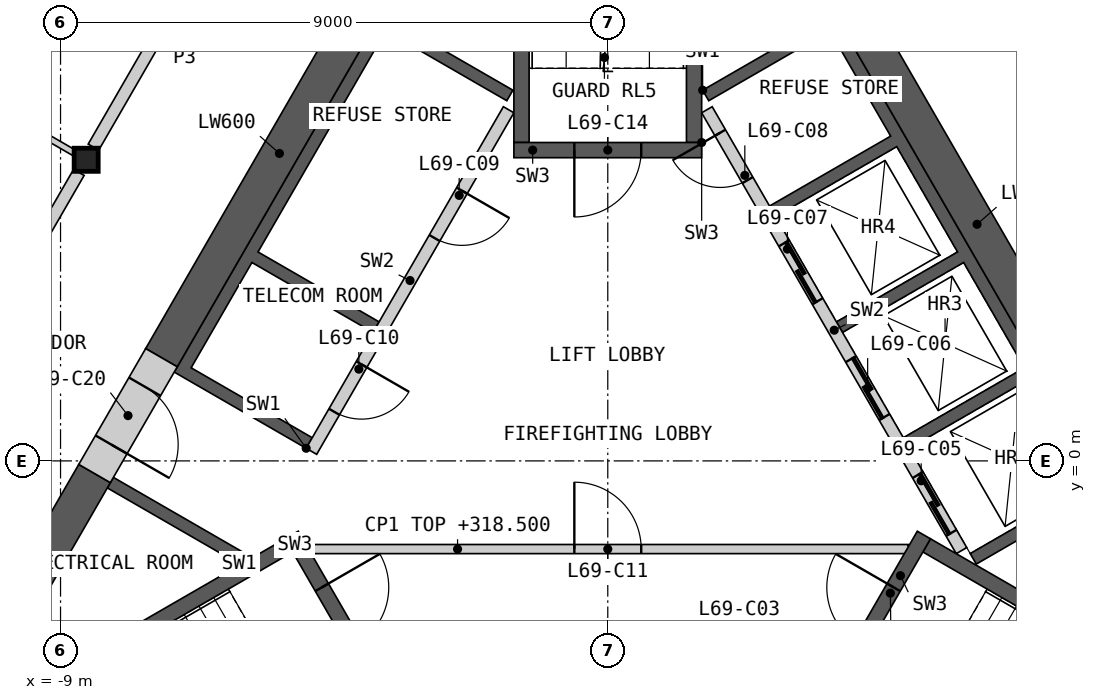
"""IFC4 building model, lengths in metres.
Left out: names, types, materials, properties, quantities, classifications, styles, units other than length and angle.
Written with IfcOpenShell. Run it as: python <this file> out.ifc"""

import sys

from ifc_helpers import new_model, si_unit, direction, frame, frame_2d, origin, origin_2d, place, context, subcontext, project, spatial, polyline, rectangle, i_section, outline, extrude, element, fill, save


model = new_model("IFC4")
c1 = context("Model", 3, precision=1e-05, world=origin(), true_north=direction((0.0, 1.0)))
c2 = subcontext(c1, "Body", "Model", "MODEL_VIEW")
j1 = project(units=[si_unit("LENGTHUNIT", "METRE"), si_unit("PLANEANGLEUNIT", "RADIAN")], contexts=[c1])
p1 = place(None, origin())
s1 = spatial("IfcSite", under=j1, at=p1, CompositionType="ELEMENT")
p2 = place(p1, origin())
s2 = spatial("IfcBuilding", under=s1, at=p2, CompositionType="ELEMENT")
p3 = place(p2, frame((0.0, 0.0, 315.4)))
s3 = spatial("IfcBuildingStorey", under=s2, at=p3, CompositionType="ELEMENT", Elevation=315.4)
p4 = place(p3, frame((-8.578, 4.953, 0.0), z_axis=(0.0, 0.0, 1.0), x_axis=(1.0, 0.0, 0.0)))
e1 = element("IfcColumn", 1, at=p4, inside=s3, PredefinedType="COLUMN", context=c2, shape_type="SweptSolid", body=[
    extrude(i_section(OverallWidth=0.396, OverallDepth=0.381, WebThickness=0.019, FlangeThickness=0.03, at=origin_2d()), origin(), (0.0, 0.0, 1.0), 3.4),
])
p5 = place(p3, origin())
e2 = element("IfcWall", 2, at=p5, inside=s3, PredefinedType="SHEAR", context=c2, shape_type="SweptSolid", body=[
    extrude(outline(polyline([(1.561, 6.097), (3.731, 7.35), (8.231, -0.444), (6.061, -1.697), (5.96, -1.524), (7.952, -0.374), (6.952, 1.358), (4.96, 0.208), (4.861, 0.381), (6.852, 1.531), (5.852, 3.263), (3.861, 2.113), (3.76, 2.287), (5.752, 3.437), (4.752, 5.169), (2.76, 4.019), (2.66, 4.192), (4.652, 5.342), (3.652, 7.074), (1.66, 5.924), (1.561, 6.097)])), origin(), (0.0, 0.0, 1.0), 3.1),
])
p6 = place(p3, frame((5.817, -1.476, 0.0), z_axis=(0.0, 0.0, 1.0), x_axis=(-0.500002616675, 0.866023893041, 0.0)))
e3 = element("IfcWall", 3, at=p6, inside=s3, PredefinedType="SOLIDWALL", context=c2, shape_type="SweptSolid", body=[
    extrude(rectangle(XDim=8.373, YDim=0.2, at=frame_2d((4.187, 0.0))), origin(), (0.0, 0.0, 1.0), 3.1),
])
p7 = place(p6, frame((0.337, 0.0, 0.0)))
e4 = element("IfcOpeningElement", 4, at=p7, cuts=e3, PredefinedType="OPENING", context=c2, shape_type="SweptSolid", body=[
    extrude(rectangle(XDim=1.1, YDim=2.1, at=frame_2d((0.55, 1.05))), frame((0.0, 0.11, 0.0), z_axis=(0.0, -1.0, 0.0), x_axis=(1.0, 0.0, 0.0)), (0.0, 0.0, 1.0), 0.22),
])
p8 = place(p6, frame((2.537, 0.0, 0.0)))
e5 = element("IfcOpeningElement", 5, at=p8, cuts=e3, PredefinedType="OPENING", context=c2, shape_type="SweptSolid", body=[
    extrude(rectangle(XDim=1.1, YDim=2.1, at=frame_2d((0.55, 1.05))), frame((0.0, 0.11, 0.0), z_axis=(0.0, -1.0, 0.0), x_axis=(1.0, 0.0, 0.0)), (0.0, 0.0, 1.0), 0.22),
])
p9 = place(p6, frame((4.737, 0.0, 0.0)))
e6 = element("IfcOpeningElement", 6, at=p9, cuts=e3, PredefinedType="OPENING", context=c2, shape_type="SweptSolid", body=[
    extrude(rectangle(XDim=1.1, YDim=2.1, at=frame_2d((0.55, 1.05))), frame((0.0, 0.11, 0.0), z_axis=(0.0, -1.0, 0.0), x_axis=(1.0, 0.0, 0.0)), (0.0, 0.0, 1.0), 0.22),
])
p10 = place(p6, frame((7.037, 0.0, 0.0)))
e7 = element("IfcOpeningElement", 7, at=p10, cuts=e3, PredefinedType="OPENING", context=c2, shape_type="SweptSolid", body=[
    extrude(rectangle(XDim=0.9, YDim=2.1, at=frame_2d((0.45, 1.05))), frame((0.0, 0.11, 0.0), z_axis=(0.0, -1.0, 0.0), x_axis=(1.0, 0.0, 0.0)), (0.0, 0.0, 1.0), 0.22),
])
p11 = place(p3, origin())
e8 = element("IfcWall", 8, at=p11, inside=s3, PredefinedType="SHEAR", context=c2, shape_type="SweptSolid", body=[
    extrude(outline(polyline([(-6.061, -1.697), (-8.231, -0.444), (-8.131, -0.271), (-5.96, -1.524), (-6.061, -1.697)])), origin(), (0.0, 0.0, 1.0), 3.1),
])
p12 = place(p3, origin())
e9 = element("IfcWall", 9, at=p12, inside=s3, PredefinedType="SHEAR", context=c2, shape_type="SweptSolid", body=[
    extrude(outline(polyline([(-4.96, 0.208), (-7.131, 1.461), (-3.731, 7.35), (-1.561, 6.097), (-1.66, 5.924), (-3.652, 7.074), (-5.752, 3.437), (-3.76, 2.287), (-3.861, 2.113), (-5.852, 3.263), (-6.852, 1.531), (-4.861, 0.381), (-4.96, 0.208)])), origin(), (0.0, 0.0, 1.0), 3.1),
])
p13 = place(p3, frame((-1.631, 5.776, 0.0), z_axis=(0.0, 0.0, 1.0), x_axis=(-0.499992876559, -0.866029516466, 0.0)))
e10 = element("IfcWall", 10, at=p13, inside=s3, PredefinedType="SOLIDWALL", context=c2, shape_type="SweptSolid", body=[
    extrude(rectangle(XDim=6.486, YDim=0.2, at=frame_2d((3.243, 0.0))), origin(), (0.0, 0.0, 1.0), 3.1),
])
p14 = place(p13, frame((1.537, 0.0, 0.0)))
e11 = element("IfcOpeningElement", 11, at=p14, cuts=e10, PredefinedType="OPENING", context=c2, shape_type="SweptSolid", body=[
    extrude(rectangle(XDim=0.9, YDim=2.1, at=frame_2d((0.45, 1.05))), frame((0.0, 0.11, 0.0), z_axis=(0.0, -1.0, 0.0), x_axis=(1.0, 0.0, 0.0)), (0.0, 0.0, 1.0), 0.22),
])
p15 = place(p13, frame((4.837, 0.0, 0.0)))
e12 = element("IfcOpeningElement", 12, at=p15, cuts=e10, PredefinedType="OPENING", context=c2, shape_type="SweptSolid", body=[
    extrude(rectangle(XDim=0.9, YDim=2.1, at=frame_2d((0.45, 1.05))), frame((0.0, 0.11, 0.0), z_axis=(0.0, -1.0, 0.0), x_axis=(1.0, 0.0, 0.0)), (0.0, 0.0, 1.0), 0.22),
])
p16 = place(p3, frame((-4.941, -1.45, 0.0), z_axis=(0.0, 0.0, 1.0), x_axis=(1.0, 0.0, 0.0)))
e13 = element("IfcWall", 13, at=p16, inside=s3, PredefinedType="PARTITIONING", context=c2, shape_type="SweptSolid", body=[
    extrude(rectangle(XDim=9.882, YDim=0.15, at=frame_2d((4.941, 0.0))), origin(), (0.0, 0.0, 1.0), 3.1),
])
p17 = place(p16, frame((4.391, 0.0, 0.0)))
e14 = element("IfcOpeningElement", 14, at=p17, cuts=e13, PredefinedType="OPENING", context=c2, shape_type="SweptSolid", body=[
    extrude(rectangle(XDim=1.1, YDim=2.1, at=frame_2d((0.55, 1.05))), frame((0.0, 0.085, 0.0), z_axis=(0.0, -1.0, 0.0), x_axis=(1.0, 0.0, 0.0)), (0.0, 0.0, 1.0), 0.17),
])
p18 = place(p3, origin())
e15 = element("IfcWall", 15, at=p18, inside=s3, PredefinedType="SHEAR", context=c2, shape_type="SweptSolid", body=[
    extrude(outline(polyline([(-5.307, -1.281), (-10.374, -4.206), (-10.032, -4.298), (-5.182, -1.498), (-5.307, -1.281)])), origin(), (0.0, 0.0, 1.0), 3.1),
])
p19 = place(p3, frame((-5.199, -1.219, 0.0), z_axis=(0.0, 0.0, 1.0), x_axis=(0.499982516597, -0.866035497597, 0.0)))
e16 = element("IfcWall", 16, at=p19, inside=s3, PredefinedType="SHEAR", context=c2, shape_type="SweptSolid", body=[
    extrude(rectangle(XDim=3.088, YDim=0.25, at=frame_2d((1.544, 0.0))), origin(), (0.0, 0.0, 1.0), 3.1),
])
p20 = place(p19, frame((0.994, 0.0, 0.0)))
e17 = element("IfcOpeningElement", 17, at=p20, cuts=e16, PredefinedType="OPENING", context=c2, shape_type="SweptSolid", body=[
    extrude(rectangle(XDim=1.1, YDim=2.1, at=frame_2d((0.55, 1.05))), frame((0.0, 0.135, 0.0), z_axis=(0.0, -1.0, 0.0), x_axis=(1.0, 0.0, 0.0)), (0.0, 0.0, 1.0), 0.27),
])
p21 = place(p3, origin())
e18 = element("IfcWall", 18, at=p21, inside=s3, PredefinedType="SHEAR", context=c2, shape_type="SweptSolid", body=[
    extrude(outline(polyline([(10.032, -4.298), (10.374, -4.206), (5.307, -1.281), (5.182, -1.498), (10.032, -4.298)])), origin(), (0.0, 0.0, 1.0), 3.1),
])
p22 = place(p3, frame((3.655, -3.893, 0.0), z_axis=(0.0, 0.0, 1.0), x_axis=(0.499982516597, 0.866035497597, 0.0)))
e19 = element("IfcWall", 19, at=p22, inside=s3, PredefinedType="SHEAR", context=c2, shape_type="SweptSolid", body=[
    extrude(rectangle(XDim=3.088, YDim=0.25, at=frame_2d((1.544, 0.0))), origin(), (0.0, 0.0, 1.0), 3.1),
])
p23 = place(p22, frame((0.994, 0.0, 0.0)))
e20 = element("IfcOpeningElement", 20, at=p23, cuts=e19, PredefinedType="OPENING", context=c2, shape_type="SweptSolid", body=[
    extrude(rectangle(XDim=1.1, YDim=2.1, at=frame_2d((0.55, 1.05))), frame((0.0, 0.135, 0.0), z_axis=(0.0, -1.0, 0.0), x_axis=(1.0, 0.0, 0.0)), (0.0, 0.0, 1.0), 0.27),
])
p24 = place(p3, origin())
e21 = element("IfcWall", 21, at=p24, inside=s3, PredefinedType="SHEAR", context=c2, shape_type="SweptSolid", body=[
    extrude(outline(polyline([(1.544, 5.237), (1.544, 11.087), (1.294, 10.837), (1.294, 5.237), (1.544, 5.237)])), origin(), (0.0, 0.0, 1.0), 3.1),
])
p25 = place(p3, origin())
e22 = element("IfcWall", 22, at=p25, inside=s3, PredefinedType="SHEAR", context=c2, shape_type="SweptSolid", body=[
    extrude(outline(polyline([(-1.294, 10.837), (-1.544, 11.087), (-1.544, 5.237), (-1.294, 5.237), (-1.294, 10.837)])), origin(), (0.0, 0.0, 1.0), 3.1),
])
p26 = place(p3, frame((1.544, 5.112, 0.0), z_axis=(0.0, 0.0, 1.0), x_axis=(-1.0, 0.0, 0.0)))
e23 = element("IfcWall", 23, at=p26, inside=s3, PredefinedType="SHEAR", context=c2, shape_type="SweptSolid", body=[
    extrude(rectangle(XDim=3.088, YDim=0.25, at=frame_2d((1.544, 0.0))), origin(), (0.0, 0.0, 1.0), 3.1),
])
p27 = place(p26, frame((0.994, 0.0, 0.0)))
e24 = element("IfcOpeningElement", 24, at=p27, cuts=e23, PredefinedType="OPENING", context=c2, shape_type="SweptSolid", body=[
    extrude(rectangle(XDim=1.1, YDim=2.1, at=frame_2d((0.55, 1.05))), frame((0.0, 0.135, 0.0), z_axis=(0.0, -1.0, 0.0), x_axis=(1.0, 0.0, 0.0)), (0.0, 0.0, 1.0), 0.27),
])
p28 = place(p3, frame((8.686, -0.634, 0.0), z_axis=(0.0, 0.0, 1.0), x_axis=(-0.50001836461, 0.866014800712, 0.0)))
e25 = element("IfcWall", 25, at=p28, inside=s3, PredefinedType="SHEAR", context=c2, shape_type="SweptSolid", body=[
    extrude(rectangle(XDim=10.451, YDim=0.6, at=frame_2d((5.225, 0.0))), origin(), (0.0, 0.0, 1.0), 3.1),
])
p29 = place(p3, frame((-3.461, 8.417, 0.0), z_axis=(0.0, 0.0, 1.0), x_axis=(-0.50000391502, -0.866023143435, 0.0)))
e26 = element("IfcWall", 26, at=p29, inside=s3, PredefinedType="SHEAR", context=c2, shape_type="SweptSolid", body=[
    extrude(rectangle(XDim=7.759, YDim=0.6, at=frame_2d((3.879, 0.0))), origin(), (0.0, 0.0, 1.0), 3.1),
])
p30 = place(p3, frame((-8.44, -0.208, 0.0), z_axis=(0.0, 0.0, 1.0), x_axis=(-0.500007425856, -0.866021116422, 0.0)))
e27 = element("IfcWall", 27, at=p30, inside=s3, PredefinedType="SHEAR", context=c2, shape_type="SweptSolid", body=[
    extrude(rectangle(XDim=4.969, YDim=0.6, at=frame_2d((2.484, 0.0))), origin(), (0.0, 0.0, 1.0), 3.1),
])
p31 = place(p3, frame((-7.34, 1.698, 0.0), z_axis=(0.0, 0.0, 1.0), x_axis=(-0.50002983664, -0.866008176907, 0.0)))
e28 = element("IfcWall", 28, at=p31, inside=s3, PredefinedType="SHEAR", context=c2, shape_type="SweptSolid", body=[
    extrude(rectangle(XDim=2.2, YDim=0.6, at=frame_2d((1.1, 0.0))), origin(), (0.0, 0.0, 1.0), 3.1),
])
p32 = place(p31, frame((0.55, 0.0, 0.0)))
e29 = element("IfcOpeningElement", 29, at=p32, cuts=e28, PredefinedType="OPENING", context=c2, shape_type="SweptSolid", body=[
    extrude(rectangle(XDim=1.1, YDim=2.1, at=frame_2d((0.55, 1.05))), frame((0.0, 0.31, 0.0), z_axis=(0.0, -1.0, 0.0), x_axis=(1.0, 0.0, 0.0)), (0.0, 0.0, 1.0), 0.62),
])
p33 = place(p3, frame((-8.458, 5.16, 0.0), z_axis=(0.0, 0.0, 1.0), x_axis=(0.499984266882, 0.866034487114, 0.0)))
e30 = element("IfcWall", 30, at=p33, inside=s3, PredefinedType="PARTITIONING", context=c2, shape_type="SweptSolid", body=[
    extrude(rectangle(XDim=8.099, YDim=0.2, at=frame_2d((4.049, 0.0))), origin(), (0.0, 0.0, 1.0), 3.1),
])
p34 = place(p33, frame((3.093, 0.0, 0.0)))
e31 = element("IfcOpeningElement", 31, at=p34, cuts=e30, PredefinedType="OPENING", context=c2, shape_type="SweptSolid", body=[
    extrude(rectangle(XDim=1.0, YDim=2.1, at=frame_2d((0.5, 1.05))), frame((0.0, 0.11, 0.0), z_axis=(0.0, -1.0, 0.0), x_axis=(1.0, 0.0, 0.0)), (0.0, 0.0, 1.0), 0.22),
])
p35 = place(p3, frame((-12.748, -2.269, 0.0), z_axis=(0.0, 0.0, 1.0), x_axis=(0.499984266882, 0.866034487114, 0.0)))
e32 = element("IfcWall", 32, at=p35, inside=s3, PredefinedType="PARTITIONING", context=c2, shape_type="SweptSolid", body=[
    extrude(rectangle(XDim=8.099, YDim=0.2, at=frame_2d((4.049, 0.0))), origin(), (0.0, 0.0, 1.0), 3.1),
])
p36 = place(p35, frame((1.164, 0.0, 0.0)))
e33 = element("IfcOpeningElement", 33, at=p36, cuts=e32, PredefinedType="OPENING", context=c2, shape_type="SweptSolid", body=[
    extrude(rectangle(XDim=1.0, YDim=2.1, at=frame_2d((0.5, 1.05))), frame((0.0, 0.11, 0.0), z_axis=(0.0, -1.0, 0.0), x_axis=(1.0, 0.0, 0.0)), (0.0, 0.0, 1.0), 0.22),
])
p37 = place(p3, frame((4.409, 12.174, 0.0), z_axis=(0.0, 0.0, 1.0), x_axis=(0.499984266882, -0.866034487114, 0.0)))
e34 = element("IfcWall", 34, at=p37, inside=s3, PredefinedType="PARTITIONING", context=c2, shape_type="SweptSolid", body=[
    extrude(rectangle(XDim=8.099, YDim=0.2, at=frame_2d((4.049, 0.0))), origin(), (0.0, 0.0, 1.0), 3.1),
])
p38 = place(p37, frame((3.905, 0.0, 0.0)))
e35 = element("IfcOpeningElement", 35, at=p38, cuts=e34, PredefinedType="OPENING", context=c2, shape_type="SweptSolid", body=[
    extrude(rectangle(XDim=1.0, YDim=2.1, at=frame_2d((0.5, 1.05))), frame((0.0, 0.11, 0.0), z_axis=(0.0, -1.0, 0.0), x_axis=(1.0, 0.0, 0.0)), (0.0, 0.0, 1.0), 0.22),
])
p39 = place(p3, frame((6.74, 15.739, 0.0), z_axis=(0.0, 0.0, 1.0), x_axis=(0.499995022685, -0.86602827742, 0.0)))
e36 = element("IfcWall", 36, at=p39, inside=s3, PredefinedType="PARTITIONING", context=c2, shape_type="SweptSolid", body=[
    extrude(rectangle(XDim=15.404, YDim=0.1, at=frame_2d((7.702, 0.0))), origin(), (0.0, 0.0, 1.0), 2.33),
])
p40 = place(p39, frame((8.582, 0.0, 0.0)))
e37 = element("IfcOpeningElement", 37, at=p40, cuts=e36, PredefinedType="OPENING", context=c2, shape_type="SweptSolid", body=[
    extrude(rectangle(XDim=0.95, YDim=2.1, at=frame_2d((0.475, 1.05))), frame((0.0, 0.06, 0.0), z_axis=(0.0, -1.0, 0.0), x_axis=(1.0, 0.0, 0.0)), (0.0, 0.0, 1.0), 0.12),
])
p41 = place(p3, frame((6.504, 12.572, 0.0), z_axis=(0.0, 0.0, 1.0), x_axis=(0.499998094172, -0.866026504112, 0.0)))
e38 = element("IfcWall", 38, at=p41, inside=s3, PredefinedType="PARTITIONING", context=c2, shape_type="SweptSolid", body=[
    extrude(rectangle(XDim=12.778, YDim=0.1, at=frame_2d((6.389, 0.0))), origin(), (0.0, 0.0, 1.0), 2.33),
])
p42 = place(p41, frame((3.759, 0.0, 0.0)))
e39 = element("IfcOpeningElement", 39, at=p42, cuts=e38, PredefinedType="OPENING", context=c2, shape_type="SweptSolid", body=[
    extrude(rectangle(XDim=0.95, YDim=2.1, at=frame_2d((0.475, 1.05))), frame((0.0, 0.06, 0.0), z_axis=(0.0, -1.0, 0.0), x_axis=(1.0, 0.0, 0.0)), (0.0, 0.0, 1.0), 0.12),
])
p43 = place(p3, frame((-13.386, 7.729, 0.0), z_axis=(0.0, 0.0, 1.0), x_axis=(0.866034036823, -0.49998504684, 0.0)))
e40 = element("IfcWall", 40, at=p43, inside=s3, PredefinedType="PARTITIONING", context=c2, shape_type="SweptSolid", body=[
    extrude(rectangle(XDim=5.312, YDim=0.1, at=frame_2d((2.656, 0.0))), origin(), (0.0, 0.0, 1.0), 2.33),
])
p44 = place(p7, origin())
e41 = element("IfcDoor", 41, at=p44, inside=s3, OperationType="SLIDING_TO_LEFT", PredefinedType="DOOR", context=c2, shape_type="SweptSolid", body=[
    extrude(rectangle(XDim=1.1, YDim=2.1, at=frame_2d((0.55, 1.05))), frame((0.0, 0.025, 0.0), z_axis=(0.0, -1.0, 0.0), x_axis=(1.0, 0.0, 0.0)), (0.0, 0.0, 1.0), 0.05),
])
fill(e4, e41)
p45 = place(p8, origin())
e42 = element("IfcDoor", 42, at=p45, inside=s3, OperationType="SLIDING_TO_LEFT", PredefinedType="DOOR", context=c2, shape_type="SweptSolid", body=[
    extrude(rectangle(XDim=1.1, YDim=2.1, at=frame_2d((0.55, 1.05))), frame((0.0, 0.025, 0.0), z_axis=(0.0, -1.0, 0.0), x_axis=(1.0, 0.0, 0.0)), (0.0, 0.0, 1.0), 0.05),
])
fill(e5, e42)
p46 = place(p9, origin())
e43 = element("IfcDoor", 43, at=p46, inside=s3, OperationType="SLIDING_TO_LEFT", PredefinedType="DOOR", context=c2, shape_type="SweptSolid", body=[
    extrude(rectangle(XDim=1.1, YDim=2.1, at=frame_2d((0.55, 1.05))), frame((0.0, 0.025, 0.0), z_axis=(0.0, -1.0, 0.0), x_axis=(1.0, 0.0, 0.0)), (0.0, 0.0, 1.0), 0.05),
])
fill(e6, e43)
p47 = place(p10, origin())
e44 = element("IfcDoor", 44, at=p47, inside=s3, OperationType="SINGLE_SWING_RIGHT", PredefinedType="DOOR", context=c2, shape_type="SweptSolid", body=[
    extrude(rectangle(XDim=0.9, YDim=2.1, at=frame_2d((0.45, 1.05))), frame((0.0, 0.025, 0.0), z_axis=(0.0, -1.0, 0.0), x_axis=(1.0, 0.0, 0.0)), (0.0, 0.0, 1.0), 0.05),
])
fill(e7, e44)
p48 = place(p14, origin())
e45 = element("IfcDoor", 45, at=p48, inside=s3, OperationType="SINGLE_SWING_LEFT", PredefinedType="DOOR", context=c2, shape_type="SweptSolid", body=[
    extrude(rectangle(XDim=0.9, YDim=2.1, at=frame_2d((0.45, 1.05))), frame((0.0, 0.025, 0.0), z_axis=(0.0, -1.0, 0.0), x_axis=(1.0, 0.0, 0.0)), (0.0, 0.0, 1.0), 0.05),
])
fill(e11, e45)
p49 = place(p15, origin())
e46 = element("IfcDoor", 46, at=p49, inside=s3, OperationType="SINGLE_SWING_LEFT", PredefinedType="DOOR", context=c2, shape_type="SweptSolid", body=[
    extrude(rectangle(XDim=0.9, YDim=2.1, at=frame_2d((0.45, 1.05))), frame((0.0, 0.025, 0.0), z_axis=(0.0, -1.0, 0.0), x_axis=(1.0, 0.0, 0.0)), (0.0, 0.0, 1.0), 0.05),
])
fill(e12, e46)
p50 = place(p17, origin())
e47 = element("IfcDoor", 47, at=p50, inside=s3, OperationType="SINGLE_SWING_LEFT", PredefinedType="DOOR", context=c2, shape_type="SweptSolid", body=[
    extrude(rectangle(XDim=1.1, YDim=2.1, at=frame_2d((0.55, 1.05))), frame((0.0, 0.025, 0.0), z_axis=(0.0, -1.0, 0.0), x_axis=(1.0, 0.0, 0.0)), (0.0, 0.0, 1.0), 0.05),
])
fill(e14, e47)
p51 = place(p20, origin())
e48 = element("IfcDoor", 48, at=p51, inside=s3, OperationType="SINGLE_SWING_LEFT", PredefinedType="DOOR", context=c2, shape_type="SweptSolid", body=[
    extrude(rectangle(XDim=1.1, YDim=2.1, at=frame_2d((0.55, 1.05))), frame((0.0, 0.025, 0.0), z_axis=(0.0, -1.0, 0.0), x_axis=(1.0, 0.0, 0.0)), (0.0, 0.0, 1.0), 0.05),
])
fill(e17, e48)
p52 = place(p23, origin())
e49 = element("IfcDoor", 49, at=p52, inside=s3, OperationType="SINGLE_SWING_RIGHT", PredefinedType="DOOR", context=c2, shape_type="SweptSolid", body=[
    extrude(rectangle(XDim=1.1, YDim=2.1, at=frame_2d((0.55, 1.05))), frame((0.0, 0.025, 0.0), z_axis=(0.0, -1.0, 0.0), x_axis=(1.0, 0.0, 0.0)), (0.0, 0.0, 1.0), 0.05),
])
fill(e20, e49)
p53 = place(p27, origin())
e50 = element("IfcDoor", 50, at=p53, inside=s3, OperationType="SINGLE_SWING_RIGHT", PredefinedType="DOOR", context=c2, shape_type="SweptSolid", body=[
    extrude(rectangle(XDim=1.1, YDim=2.1, at=frame_2d((0.55, 1.05))), frame((0.0, 0.025, 0.0), z_axis=(0.0, -1.0, 0.0), x_axis=(1.0, 0.0, 0.0)), (0.0, 0.0, 1.0), 0.05),
])
fill(e24, e50)
p54 = place(p32, origin())
e51 = element("IfcDoor", 51, at=p54, inside=s3, OperationType="SINGLE_SWING_RIGHT", PredefinedType="DOOR", context=c2, shape_type="SweptSolid", body=[
    extrude(rectangle(XDim=1.1, YDim=2.1, at=frame_2d((0.55, 1.05))), frame((0.0, 0.055, 0.0), z_axis=(0.0, -1.0, 0.0), x_axis=(1.0, 0.0, 0.0)), (0.0, 0.0, 1.0), 0.05),
])
fill(e29, e51)
save(model, sys.argv[1])
